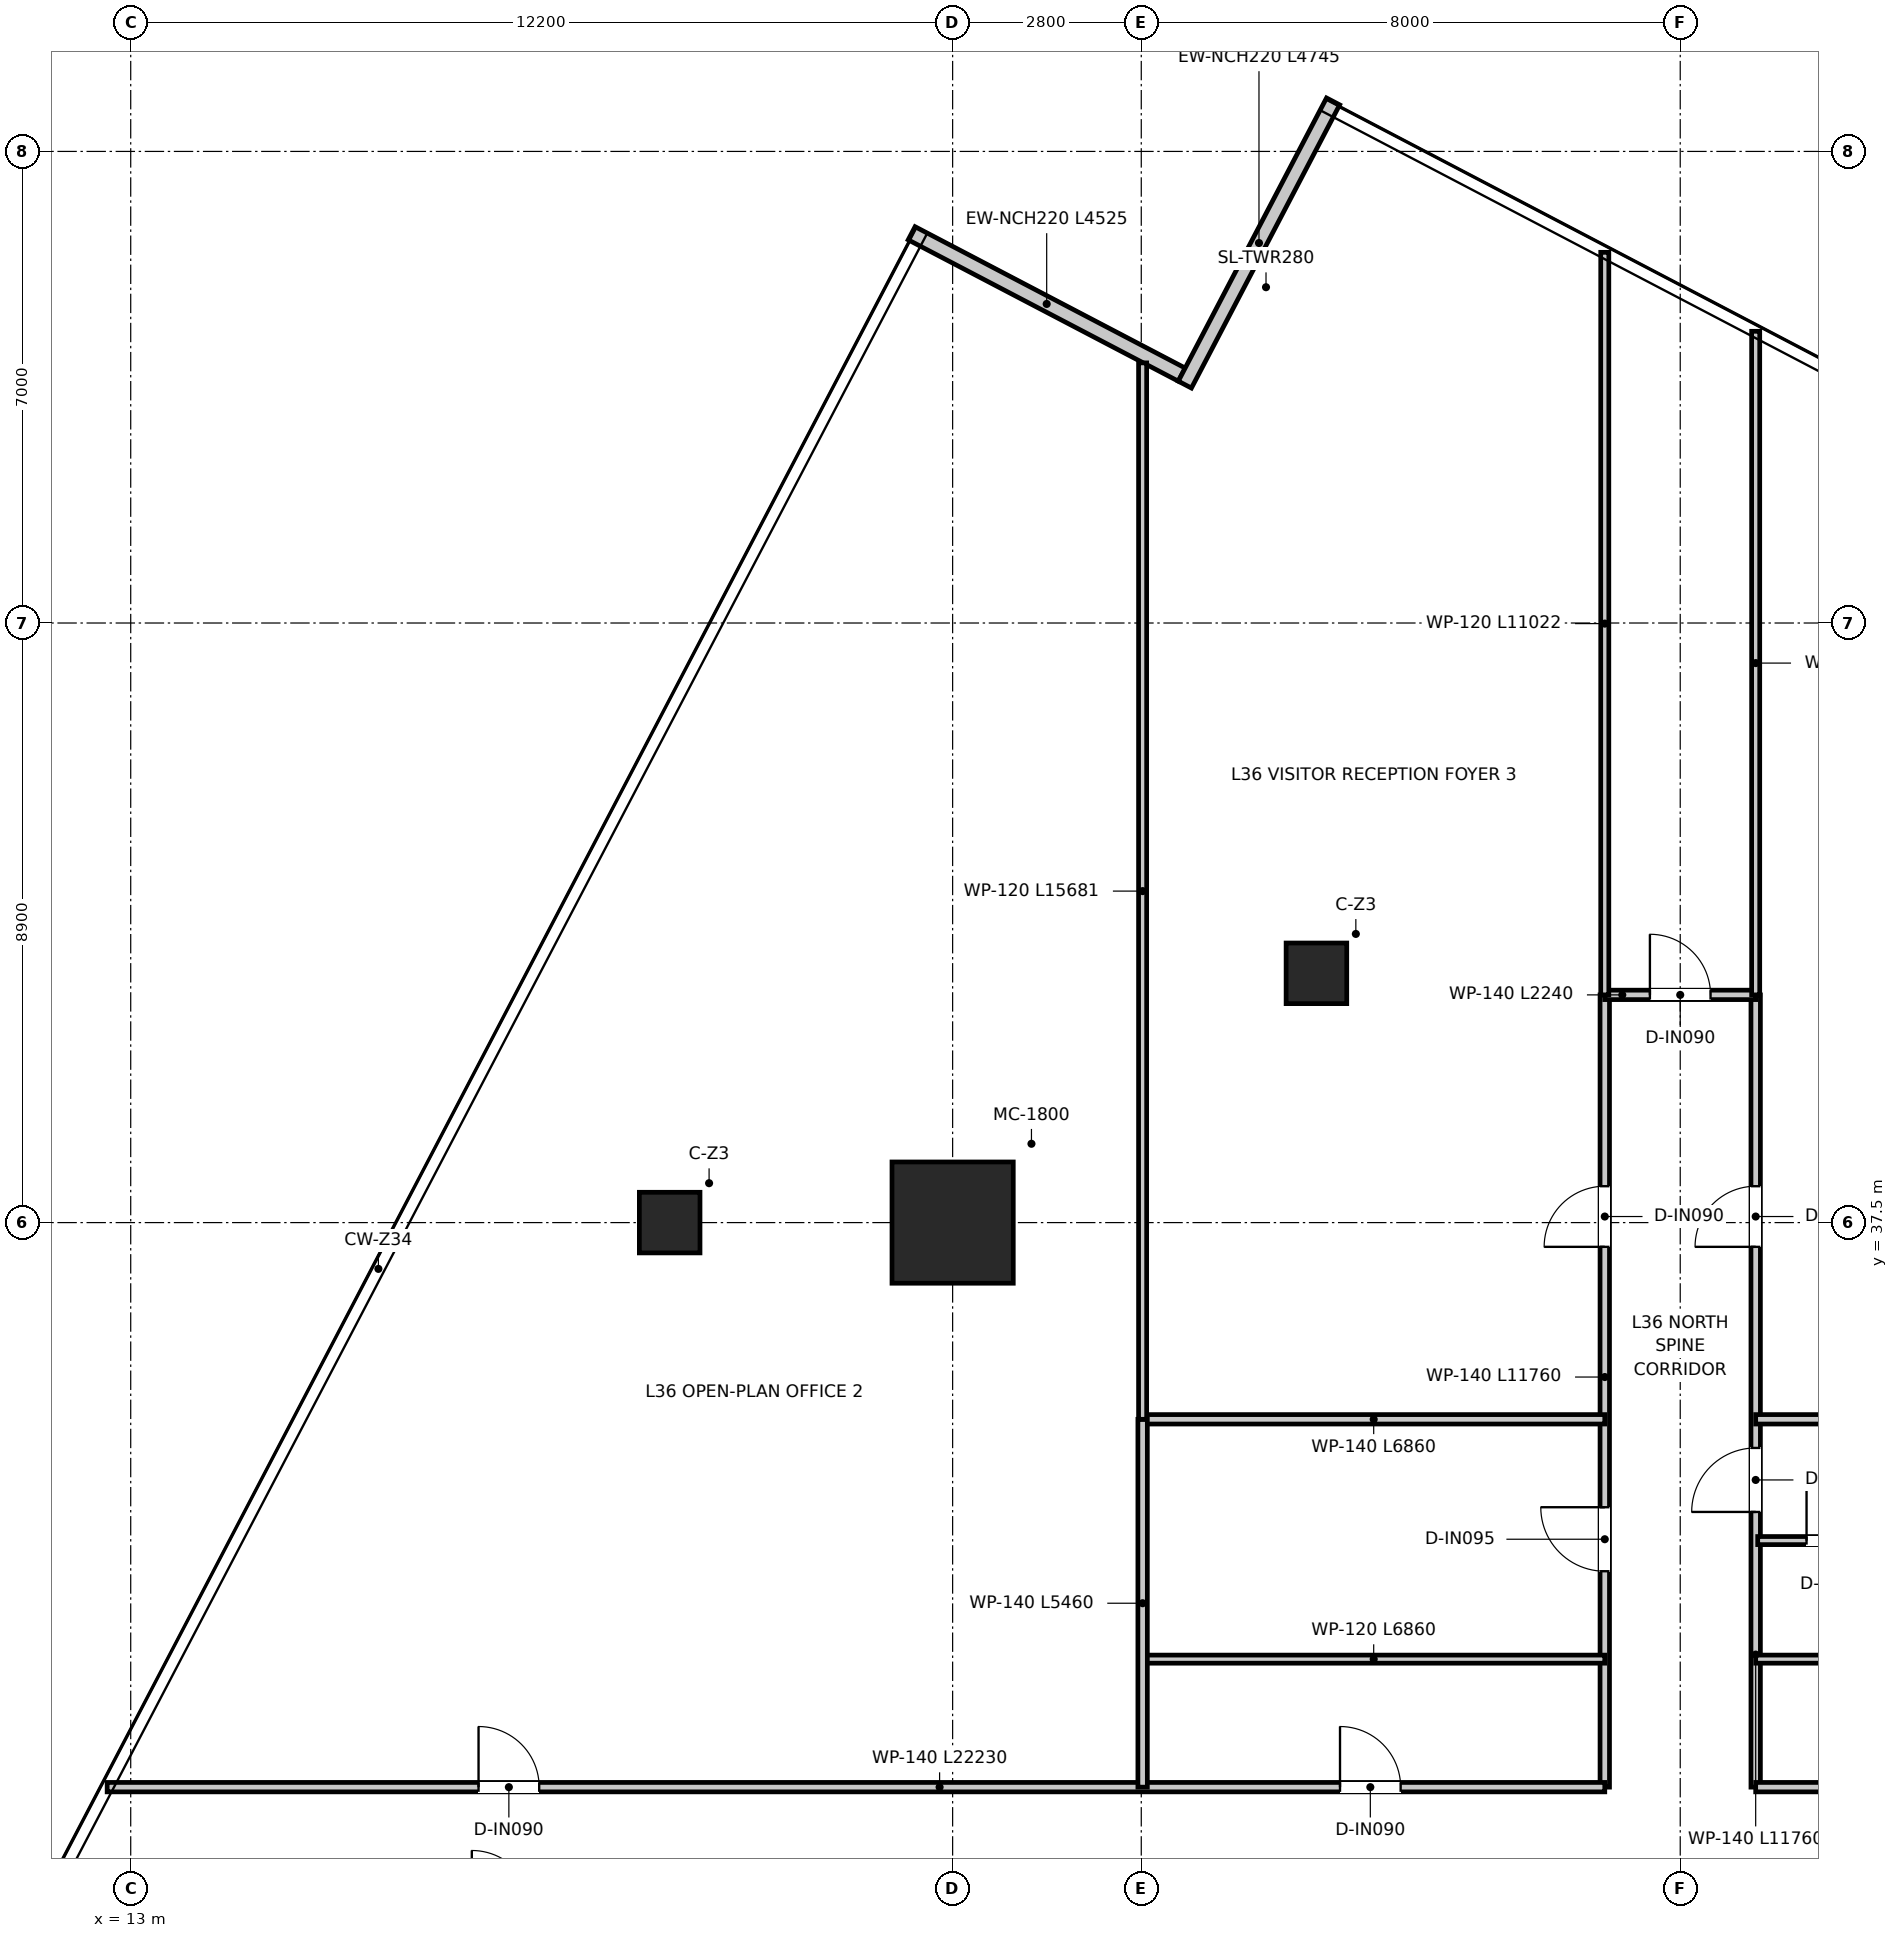
"""IFC4 building model, lengths in metres.
Left out: names, types, materials, properties, quantities, classifications, styles, units other than length and angle.
Written with IfcOpenShell. Run it as: python <this file> out.ifc"""

import sys

from ifc_helpers import new_model, si_unit, direction, frame, frame_2d, origin, origin_2d, place, context, subcontext, project, spatial, rectangle, extrude, source, transform, mapped, element, fill, save


model = new_model("IFC4")
c1 = context("Model", 3, precision=1e-05, world=origin(), true_north=direction((0.0, 1.0)))
c2 = subcontext(c1, "Body", "Model", "MODEL_VIEW")
j1 = project(units=[si_unit("LENGTHUNIT", "METRE"), si_unit("PLANEANGLEUNIT", "RADIAN")], contexts=[c1])
p1 = place(None, origin())
s1 = spatial("IfcSite", under=j1, at=p1, CompositionType="ELEMENT")
p2 = place(p1, origin())
s2 = spatial("IfcBuilding", under=s1, at=p2, CompositionType="ELEMENT")
p3 = place(p2, frame((0.0, 0.0, 150.15)))
s3 = spatial("IfcBuildingStorey", under=s2, at=p3, CompositionType="ELEMENT", Elevation=150.15)
m1 = source(origin(), c2, "Body", "SweptSolid", [
    extrude(rectangle(XDim=1.8, YDim=1.8, at=origin_2d()), origin(), (0.0, 0.0, 1.0), 3.95),
])
p4 = place(p3, frame((25.2, 37.5, 0.0), z_axis=(0.0, 0.0, 1.0), x_axis=(1.0, 0.0, 0.0)))
e1 = element("IfcColumn", 1, at=p4, inside=s3, PredefinedType="USERDEFINED", context=c2, shape_type="MappedRepresentation", body=[
    mapped(m1, transform((0.0, 0.0, 0.0), x_axis=(1.0, 0.0, 0.0), y_axis=(0.0, 1.0, 0.0), z_axis=(0.0, 0.0, 1.0), scale=1.0)),
])
m2 = source(origin(), c2, "Body", "SweptSolid", [
    extrude(rectangle(XDim=0.9, YDim=0.9, at=origin_2d()), origin(), (0.0, 0.0, 1.0), 3.95),
])
for number, where, z_axis, x_axis in (
    (2, (21.0, 37.5, 0.0), (0.0, 0.0, 1.0), (1.0, 0.0, 0.0)),
    (3, (30.6, 41.2, 0.0), (0.0, 0.0, 1.0), (1.0, 0.0, 0.0)),
):
    element("IfcColumn", number, at=place(p3, frame(where, z_axis=z_axis, x_axis=x_axis)), inside=s3, PredefinedType="COLUMN", context=c2, shape_type="MappedRepresentation", body=[
        mapped(m2, transform((0.0, 0.0, 0.0), x_axis=(1.0, 0.0, 0.0), y_axis=(0.0, 1.0, 0.0), z_axis=(0.0, 0.0, 1.0), scale=1.0)),
    ])
p5 = place(p3, frame((28.601, 50.087, 0.0), z_axis=(0.0, 0.0, 1.0), x_axis=(-0.885997280363, 0.463690434653, 0.0)))
e4 = element("IfcWall", 4, at=p5, inside=s3, PredefinedType="ELEMENTEDWALL", context=c2, shape_type="SweptSolid", body=[
    extrude(rectangle(XDim=4.525, YDim=0.22, at=frame_2d((2.262, 0.0))), origin(), (0.0, 0.0, 1.0), 3.67),
])
p6 = place(p3, frame((30.847, 54.143, 0.0), z_axis=(0.0, 0.0, 1.0), x_axis=(-0.463643579795, -0.886021800474, 0.0)))
e5 = element("IfcWall", 5, at=p6, inside=s3, PredefinedType="ELEMENTEDWALL", context=c2, shape_type="SweptSolid", body=[
    extrude(rectangle(XDim=4.745, YDim=0.22, at=frame_2d((2.373, 0.0))), origin(), (0.0, 0.0, 1.0), 3.67),
])
p7 = place(p3, frame((34.88, 29.12, 0.0), z_axis=(0.0, 0.0, 1.0), x_axis=(0.0, 1.0, 0.0)))
e6 = element("IfcWall", 6, at=p7, inside=s3, PredefinedType="PARTITIONING", context=c2, shape_type="SweptSolid", body=[
    extrude(rectangle(XDim=11.76, YDim=0.14, at=frame_2d((5.88, 0.0))), origin(), (0.0, 0.0, 1.0), 3.03),
])
p8 = place(p7, frame((3.205, 0.0, 0.0)))
e7 = element("IfcOpeningElement", 7, at=p8, cuts=e6, PredefinedType="OPENING", context=c2, shape_type="SweptSolid", body=[
    extrude(rectangle(XDim=0.95, YDim=2.1, at=frame_2d((0.475, 1.05))), frame((0.0, 0.08, 0.0), z_axis=(0.0, -1.0, 0.0), x_axis=(1.0, 0.0, 0.0)), (0.0, 0.0, 1.0), 0.16),
])
p9 = place(p7, frame((8.02, 0.0, 0.0)))
e8 = element("IfcOpeningElement", 8, at=p9, cuts=e6, PredefinedType="OPENING", context=c2, shape_type="SweptSolid", body=[
    extrude(rectangle(XDim=0.9, YDim=2.1, at=frame_2d((0.45, 1.05))), frame((0.0, 0.08, 0.0), z_axis=(0.0, -1.0, 0.0), x_axis=(1.0, 0.0, 0.0)), (0.0, 0.0, 1.0), 0.16),
])
p10 = place(p3, frame((37.12, 29.12, 0.0), z_axis=(0.0, 0.0, 1.0), x_axis=(0.0, 1.0, 0.0)))
e9 = element("IfcWall", 9, at=p10, inside=s3, PredefinedType="PARTITIONING", context=c2, shape_type="SweptSolid", body=[
    extrude(rectangle(XDim=11.76, YDim=0.14, at=frame_2d((5.88, 0.0))), origin(), (0.0, 0.0, 1.0), 3.03),
])
p11 = place(p10, frame((4.085, 0.0, 0.0)))
e10 = element("IfcOpeningElement", 10, at=p11, cuts=e9, PredefinedType="OPENING", context=c2, shape_type="SweptSolid", body=[
    extrude(rectangle(XDim=0.95, YDim=2.1, at=frame_2d((0.475, 1.05))), frame((0.0, 0.08, 0.0), z_axis=(0.0, -1.0, 0.0), x_axis=(1.0, 0.0, 0.0)), (0.0, 0.0, 1.0), 0.16),
])
p12 = place(p10, frame((8.02, 0.0, 0.0)))
e11 = element("IfcOpeningElement", 11, at=p12, cuts=e9, PredefinedType="OPENING", context=c2, shape_type="SweptSolid", body=[
    extrude(rectangle(XDim=0.9, YDim=2.1, at=frame_2d((0.45, 1.05))), frame((0.0, 0.08, 0.0), z_axis=(0.0, -1.0, 0.0), x_axis=(1.0, 0.0, 0.0)), (0.0, 0.0, 1.0), 0.16),
])
p13 = place(p3, frame((34.88, 40.88, 0.0), z_axis=(0.0, 0.0, 1.0), x_axis=(1.0, 0.0, 0.0)))
e12 = element("IfcWall", 12, at=p13, inside=s3, PredefinedType="PARTITIONING", context=c2, shape_type="SweptSolid", body=[
    extrude(rectangle(XDim=2.24, YDim=0.14, at=frame_2d((1.12, 0.0))), origin(), (0.0, 0.0, 1.0), 3.67),
])
p14 = place(p13, frame((0.67, 0.0, 0.0)))
e13 = element("IfcOpeningElement", 13, at=p14, cuts=e12, PredefinedType="OPENING", context=c2, shape_type="SweptSolid", body=[
    extrude(rectangle(XDim=0.9, YDim=2.1, at=frame_2d((0.45, 1.05))), frame((0.0, 0.08, 0.0), z_axis=(0.0, -1.0, 0.0), x_axis=(1.0, 0.0, 0.0)), (0.0, 0.0, 1.0), 0.16),
])
p15 = place(p3, frame((12.65, 29.12, 0.0), z_axis=(0.0, 0.0, 1.0), x_axis=(1.0, 0.0, 0.0)))
e14 = element("IfcWall", 14, at=p15, inside=s3, PredefinedType="PARTITIONING", context=c2, shape_type="SweptSolid", body=[
    extrude(rectangle(XDim=22.229, YDim=0.14, at=frame_2d((11.115, 0.0))), origin(), (0.0, 0.0, 1.0), 3.03),
])
p16 = place(p15, frame((18.3, 0.0, 0.0)))
e15 = element("IfcOpeningElement", 15, at=p16, cuts=e14, PredefinedType="OPENING", context=c2, shape_type="SweptSolid", body=[
    extrude(rectangle(XDim=0.9, YDim=2.1, at=frame_2d((0.45, 1.05))), frame((0.0, 0.08, 0.0), z_axis=(0.0, -1.0, 0.0), x_axis=(1.0, 0.0, 0.0)), (0.0, 0.0, 1.0), 0.16),
])
p17 = place(p15, frame((5.513, 0.0, 0.0)))
e16 = element("IfcOpeningElement", 16, at=p17, cuts=e14, PredefinedType="OPENING", context=c2, shape_type="SweptSolid", body=[
    extrude(rectangle(XDim=0.9, YDim=2.1, at=frame_2d((0.45, 1.05))), frame((0.0, 0.08, 0.0), z_axis=(0.0, -1.0, 0.0), x_axis=(1.0, 0.0, 0.0)), (0.0, 0.0, 1.0), 0.16),
])
p18 = place(p3, frame((37.12, 29.12, 0.0), z_axis=(0.0, 0.0, 1.0), x_axis=(1.0, 0.0, 0.0)))
e17 = element("IfcWall", 17, at=p18, inside=s3, PredefinedType="PARTITIONING", context=c2, shape_type="SweptSolid", body=[
    extrude(rectangle(XDim=24.763, YDim=0.14, at=frame_2d((12.381, 0.0))), origin(), (0.0, 0.0, 1.0), 3.03),
])
p19 = place(p18, frame((3.03, 0.0, 0.0)))
e18 = element("IfcOpeningElement", 18, at=p19, cuts=e17, PredefinedType="OPENING", context=c2, shape_type="SweptSolid", body=[
    extrude(rectangle(XDim=0.9, YDim=2.1, at=frame_2d((0.45, 1.05))), frame((0.0, 0.08, 0.0), z_axis=(0.0, -1.0, 0.0), x_axis=(1.0, 0.0, 0.0)), (0.0, 0.0, 1.0), 0.16),
])
p20 = place(p18, frame((8.52, 0.0, 0.0)))
e19 = element("IfcOpeningElement", 19, at=p20, cuts=e17, PredefinedType="OPENING", context=c2, shape_type="SweptSolid", body=[
    extrude(rectangle(XDim=0.9, YDim=2.1, at=frame_2d((0.45, 1.05))), frame((0.0, 0.08, 0.0), z_axis=(0.0, -1.0, 0.0), x_axis=(1.0, 0.0, 0.0)), (0.0, 0.0, 1.0), 0.16),
])
p21 = place(p18, frame((12.13, 0.0, 0.0)))
e20 = element("IfcOpeningElement", 20, at=p21, cuts=e17, PredefinedType="OPENING", context=c2, shape_type="SweptSolid", body=[
    extrude(rectangle(XDim=0.9, YDim=2.1, at=frame_2d((0.45, 1.05))), frame((0.0, 0.08, 0.0), z_axis=(0.0, -1.0, 0.0), x_axis=(1.0, 0.0, 0.0)), (0.0, 0.0, 1.0), 0.16),
])
p22 = place(p18, frame((19.217, 0.0, 0.0)))
e21 = element("IfcOpeningElement", 21, at=p22, cuts=e17, PredefinedType="OPENING", context=c2, shape_type="SweptSolid", body=[
    extrude(rectangle(XDim=0.9, YDim=2.1, at=frame_2d((0.45, 1.05))), frame((0.0, 0.08, 0.0), z_axis=(0.0, -1.0, 0.0), x_axis=(1.0, 0.0, 0.0)), (0.0, 0.0, 1.0), 0.16),
])
for number, where, z_axis, x_axis in (
    (22, (28.02, 31.02, 0.0), (0.0, 0.0, 1.0), (1.0, 0.0, 0.0)),
    (23, (37.12, 31.02, 0.0), (0.0, 0.0, 1.0), (1.0, 0.0, 0.0)),
):
    element("IfcWall", number, at=place(p3, frame(where, z_axis=z_axis, x_axis=x_axis)), inside=s3, PredefinedType="PARTITIONING", context=c2, shape_type="SweptSolid", body=[
        extrude(rectangle(XDim=6.86, YDim=0.12, at=frame_2d((3.43, 0.0))), origin(), (0.0, 0.0, 1.0), 3.08),
    ])
for number, where, z_axis, x_axis in (
    (24, (28.02, 34.58, 0.0), (0.0, 0.0, 1.0), (1.0, 0.0, 0.0)),
    (25, (37.12, 34.58, 0.0), (0.0, 0.0, 1.0), (1.0, 0.0, 0.0)),
):
    element("IfcWall", number, at=place(p3, frame(where, z_axis=z_axis, x_axis=x_axis)), inside=s3, PredefinedType="PARTITIONING", context=c2, shape_type="SweptSolid", body=[
        extrude(rectangle(XDim=6.86, YDim=0.14, at=frame_2d((3.43, 0.0))), origin(), (0.0, 0.0, 1.0), 3.08),
    ])
p23 = place(p3, frame((28.02, 29.12, 0.0), z_axis=(0.0, 0.0, 1.0), x_axis=(0.0, 1.0, 0.0)))
e26 = element("IfcWall", 26, at=p23, inside=s3, PredefinedType="PARTITIONING", context=c2, shape_type="SweptSolid", body=[
    extrude(rectangle(XDim=5.46, YDim=0.14, at=frame_2d((2.73, 0.0))), origin(), (0.0, 0.0, 1.0), 3.31),
])
p24 = place(p3, frame((37.15, 32.78, 0.0), z_axis=(0.0, 0.0, 1.0), x_axis=(1.0, 0.0, 0.0)))
e27 = element("IfcWall", 27, at=p24, inside=s3, PredefinedType="PARTITIONING", context=c2, shape_type="SweptSolid", body=[
    extrude(rectangle(XDim=6.8, YDim=0.12, at=frame_2d((3.4, 0.0))), origin(), (0.0, 0.0, 1.0), 3.08),
])
p25 = place(p24, frame((0.725, 0.0, 0.0)))
e28 = element("IfcOpeningElement", 28, at=p25, cuts=e27, PredefinedType="OPENING", context=c2, shape_type="SweptSolid", body=[
    extrude(rectangle(XDim=0.85, YDim=2.1, at=frame_2d((0.425, 1.05))), frame((0.0, 0.07, 0.0), z_axis=(0.0, -1.0, 0.0), x_axis=(1.0, 0.0, 0.0)), (0.0, 0.0, 1.0), 0.14),
])
p26 = place(p24, frame((3.065, 0.0, 0.0)))
e29 = element("IfcOpeningElement", 29, at=p26, cuts=e27, PredefinedType="OPENING", context=c2, shape_type="SweptSolid", body=[
    extrude(rectangle(XDim=0.85, YDim=2.1, at=frame_2d((0.425, 1.05))), frame((0.0, 0.07, 0.0), z_axis=(0.0, -1.0, 0.0), x_axis=(1.0, 0.0, 0.0)), (0.0, 0.0, 1.0), 0.14),
])
p27 = place(p24, frame((5.25, 0.0, 0.0)))
e30 = element("IfcOpeningElement", 30, at=p27, cuts=e27, PredefinedType="OPENING", context=c2, shape_type="SweptSolid", body=[
    extrude(rectangle(XDim=0.9, YDim=2.1, at=frame_2d((0.45, 1.05))), frame((0.0, 0.07, 0.0), z_axis=(0.0, -1.0, 0.0), x_axis=(1.0, 0.0, 0.0)), (0.0, 0.0, 1.0), 0.14),
])
p28 = place(p3, frame((34.88, 40.88, 0.0), z_axis=(0.0, 0.0, 1.0), x_axis=(0.0, 1.0, 0.0)))
e31 = element("IfcWall", 31, at=p28, inside=s3, PredefinedType="PARTITIONING", context=c2, shape_type="SweptSolid", body=[
    extrude(rectangle(XDim=11.022, YDim=0.12, at=frame_2d((5.511, 0.0))), origin(), (0.0, 0.0, 1.0), 3.28),
])
p29 = place(p3, frame((37.12, 40.88, 0.0), z_axis=(0.0, 0.0, 1.0), x_axis=(0.0, 1.0, 0.0)))
e32 = element("IfcWall", 32, at=p29, inside=s3, PredefinedType="PARTITIONING", context=c2, shape_type="SweptSolid", body=[
    extrude(rectangle(XDim=9.85, YDim=0.12, at=frame_2d((4.925, 0.0))), origin(), (0.0, 0.0, 1.0), 3.28),
])
p30 = place(p3, frame((28.02, 34.58, 0.0), z_axis=(0.0, 0.0, 1.0), x_axis=(0.0, 1.0, 0.0)))
e33 = element("IfcWall", 33, at=p30, inside=s3, PredefinedType="PARTITIONING", context=c2, shape_type="SweptSolid", body=[
    extrude(rectangle(XDim=15.681, YDim=0.12, at=frame_2d((7.841, 0.0))), origin(), (0.0, 0.0, 1.0), 3.03),
])
p31 = place(p16, origin())
e34 = element("IfcDoor", 34, at=p31, inside=s3, OperationType="SINGLE_SWING_LEFT", PredefinedType="DOOR", context=c2, shape_type="SweptSolid", body=[
    extrude(rectangle(XDim=0.9, YDim=2.1, at=frame_2d((0.45, 1.05))), frame((0.0, 0.025, 0.0), z_axis=(0.0, -1.0, 0.0), x_axis=(1.0, 0.0, 0.0)), (0.0, 0.0, 1.0), 0.05),
])
fill(e15, e34)
p32 = place(p11, origin())
e35 = element("IfcDoor", 35, at=p32, inside=s3, OperationType="SINGLE_SWING_LEFT", PredefinedType="DOOR", context=c2, shape_type="SweptSolid", body=[
    extrude(rectangle(XDim=0.95, YDim=2.1, at=frame_2d((0.475, 1.05))), frame((0.0, 0.025, 0.0), z_axis=(0.0, -1.0, 0.0), x_axis=(1.0, 0.0, 0.0)), (0.0, 0.0, 1.0), 0.05),
])
fill(e10, e35)
p33 = place(p8, origin())
e36 = element("IfcDoor", 36, at=p33, inside=s3, OperationType="SINGLE_SWING_RIGHT", PredefinedType="DOOR", context=c2, shape_type="SweptSolid", body=[
    extrude(rectangle(XDim=0.95, YDim=2.1, at=frame_2d((0.475, 1.05))), frame((0.0, 0.025, 0.0), z_axis=(0.0, -1.0, 0.0), x_axis=(1.0, 0.0, 0.0)), (0.0, 0.0, 1.0), 0.05),
])
fill(e7, e36)
p34 = place(p25, origin())
e37 = element("IfcDoor", 37, at=p34, inside=s3, OperationType="SINGLE_SWING_LEFT", PredefinedType="DOOR", context=c2, shape_type="SweptSolid", body=[
    extrude(rectangle(XDim=0.85, YDim=2.1, at=frame_2d((0.425, 1.05))), frame((0.0, 0.025, 0.0), z_axis=(0.0, -1.0, 0.0), x_axis=(1.0, 0.0, 0.0)), (0.0, 0.0, 1.0), 0.05),
])
fill(e28, e37)
p35 = place(p14, origin())
e38 = element("IfcDoor", 38, at=p35, inside=s3, OperationType="SINGLE_SWING_LEFT", PredefinedType="DOOR", context=c2, shape_type="SweptSolid", body=[
    extrude(rectangle(XDim=0.9, YDim=2.1, at=frame_2d((0.45, 1.05))), frame((0.0, 0.025, 0.0), z_axis=(0.0, -1.0, 0.0), x_axis=(1.0, 0.0, 0.0)), (0.0, 0.0, 1.0), 0.05),
])
fill(e13, e38)
p36 = place(p17, origin())
e39 = element("IfcDoor", 39, at=p36, inside=s3, OperationType="SINGLE_SWING_LEFT", PredefinedType="DOOR", context=c2, shape_type="SweptSolid", body=[
    extrude(rectangle(XDim=0.9, YDim=2.1, at=frame_2d((0.45, 1.05))), frame((0.0, 0.025, 0.0), z_axis=(0.0, -1.0, 0.0), x_axis=(1.0, 0.0, 0.0)), (0.0, 0.0, 1.0), 0.05),
])
fill(e16, e39)
p37 = place(p9, origin())
e40 = element("IfcDoor", 40, at=p37, inside=s3, OperationType="SINGLE_SWING_LEFT", PredefinedType="DOOR", context=c2, shape_type="SweptSolid", body=[
    extrude(rectangle(XDim=0.9, YDim=2.1, at=frame_2d((0.45, 1.05))), frame((0.0, 0.025, 0.0), z_axis=(0.0, -1.0, 0.0), x_axis=(1.0, 0.0, 0.0)), (0.0, 0.0, 1.0), 0.05),
])
fill(e8, e40)
p38 = place(p12, origin())
e41 = element("IfcDoor", 41, at=p38, inside=s3, OperationType="SINGLE_SWING_LEFT", PredefinedType="DOOR", context=c2, shape_type="SweptSolid", body=[
    extrude(rectangle(XDim=0.9, YDim=2.1, at=frame_2d((0.45, 1.05))), frame((0.0, 0.025, 0.0), z_axis=(0.0, -1.0, 0.0), x_axis=(1.0, 0.0, 0.0)), (0.0, 0.0, 1.0), 0.05),
])
fill(e11, e41)
save(model, sys.argv[1])
